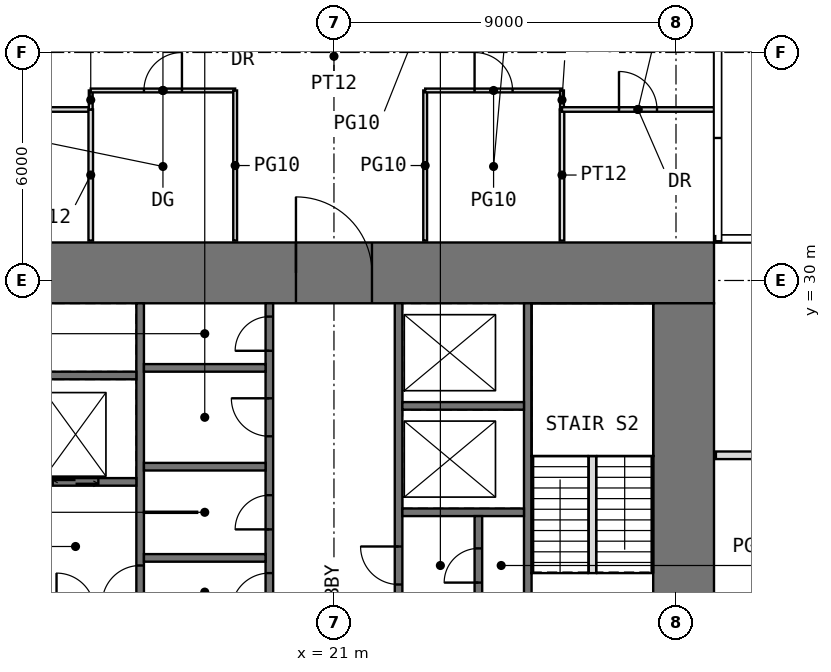
"""IFC4 building model, lengths in metres.
Left out: names, types, materials, properties, quantities, classifications, styles, units other than length and angle.
Written with IfcOpenShell. Run it as: python <this file> out.ifc"""

import sys

from ifc_helpers import new_model, si_unit, direction, frame, frame_2d, origin, place, context, subcontext, project, spatial, rectangle, extrude, element, fill, save


model = new_model("IFC4")
c1 = context("Model", 3, precision=1e-05, world=origin(), true_north=direction((0.0, 1.0)))
c2 = subcontext(c1, "Body", "Model", "MODEL_VIEW")
j1 = project(units=[si_unit("LENGTHUNIT", "METRE"), si_unit("PLANEANGLEUNIT", "RADIAN")], contexts=[c1])
p1 = place(None, origin())
s1 = spatial("IfcSite", under=j1, at=p1, CompositionType="ELEMENT")
p2 = place(p1, origin())
s2 = spatial("IfcBuilding", under=s1, at=p2, CompositionType="ELEMENT")
p3 = place(p2, frame((0.0, 0.0, 104.5)))
s3 = spatial("IfcBuildingStorey", under=s2, at=p3, CompositionType="ELEMENT", Elevation=104.5)
p4 = place(p3, frame((11.0, 30.2, -0.05), z_axis=(0.0, 0.0, 1.0), x_axis=(1.0, 0.0, 0.0)))
e1 = element("IfcWall", 1, at=p4, inside=s3, PredefinedType="SHEAR", context=c2, shape_type="SweptSolid", body=[
    extrude(rectangle(XDim=20.0, YDim=1.6, at=frame_2d((10.0, 0.0))), origin(), (0.0, 0.0, 1.0), 4.0),
])
p5 = place(p4, frame((9.0, 0.0, 0.05)))
e2 = element("IfcOpeningElement", 2, at=p5, cuts=e1, PredefinedType="OPENING", context=c2, shape_type="SweptSolid", body=[
    extrude(rectangle(XDim=2.0, YDim=2.2, at=frame_2d((1.0, 1.1))), frame((0.0, 0.81, 0.0), z_axis=(0.0, -1.0, 0.0), x_axis=(1.0, 0.0, 0.0)), (0.0, 0.0, 1.0), 1.62),
])
p6 = place(p3, frame((30.2, 12.6, -0.05), z_axis=(0.0, 0.0, 1.0), x_axis=(0.0, 1.0, 0.0)))
e3 = element("IfcWall", 3, at=p6, inside=s3, PredefinedType="SHEAR", context=c2, shape_type="SweptSolid", body=[
    extrude(rectangle(XDim=16.8, YDim=1.6, at=frame_2d((8.4, 0.0))), origin(), (0.0, 0.0, 1.0), 4.0),
])
p7 = place(p6, frame((5.9, 0.0, 0.05)))
e4 = element("IfcOpeningElement", 4, at=p7, cuts=e3, PredefinedType="OPENING", context=c2, shape_type="SweptSolid", body=[
    extrude(rectangle(XDim=1.0, YDim=2.2, at=frame_2d((0.5, 1.1))), frame((0.0, 0.81, 0.0), z_axis=(0.0, -1.0, 0.0), x_axis=(1.0, 0.0, 0.0)), (0.0, 0.0, 1.0), 1.62),
])
p8 = place(p3, frame((15.9, 12.6, -0.05), z_axis=(0.0, 0.0, 1.0), x_axis=(0.0, 1.0, 0.0)))
e5 = element("IfcWall", 5, at=p8, inside=s3, PredefinedType="SHEAR", context=c2, shape_type="SweptSolid", body=[
    extrude(rectangle(XDim=16.8, YDim=0.2, at=frame_2d((8.4, 0.0))), origin(), (0.0, 0.0, 1.0), 4.0),
])
p9 = place(p8, frame((8.9, 0.0, 0.05)))
e6 = element("IfcOpeningElement", 6, at=p9, cuts=e5, PredefinedType="OPENING", context=c2, shape_type="SweptSolid", body=[
    extrude(rectangle(XDim=1.0, YDim=2.2, at=frame_2d((0.5, 1.1))), frame((0.0, 0.11, 0.0), z_axis=(0.0, -1.0, 0.0), x_axis=(1.0, 0.0, 0.0)), (0.0, 0.0, 1.0), 0.22),
])
p10 = place(p3, frame((19.3, 12.6, -0.05), z_axis=(0.0, 0.0, 1.0), x_axis=(0.0, 1.0, 0.0)))
e7 = element("IfcWall", 7, at=p10, inside=s3, PredefinedType="SHEAR", context=c2, shape_type="SweptSolid", body=[
    extrude(rectangle(XDim=16.8, YDim=0.2, at=frame_2d((8.4, 0.0))), origin(), (0.0, 0.0, 1.0), 4.0),
])
p11 = place(p10, frame((8.7, 0.0, 0.05)))
e8 = element("IfcOpeningElement", 8, at=p11, cuts=e7, PredefinedType="OPENING", context=c2, shape_type="SweptSolid", body=[
    extrude(rectangle(XDim=1.0, YDim=2.2, at=frame_2d((0.5, 1.1))), frame((0.0, 0.11, 0.0), z_axis=(0.0, -1.0, 0.0), x_axis=(1.0, 0.0, 0.0)), (0.0, 0.0, 1.0), 0.22),
])
p12 = place(p10, frame((10.85, 0.0, 0.05)))
e9 = element("IfcOpeningElement", 9, at=p12, cuts=e7, PredefinedType="OPENING", context=c2, shape_type="SweptSolid", body=[
    extrude(rectangle(XDim=0.9, YDim=2.2, at=frame_2d((0.45, 1.1))), frame((0.0, 0.11, 0.0), z_axis=(0.0, -1.0, 0.0), x_axis=(1.0, 0.0, 0.0)), (0.0, 0.0, 1.0), 0.22),
])
p13 = place(p10, frame((13.3, 0.0, 0.05)))
e10 = element("IfcOpeningElement", 10, at=p13, cuts=e7, PredefinedType="OPENING", context=c2, shape_type="SweptSolid", body=[
    extrude(rectangle(XDim=1.0, YDim=2.2, at=frame_2d((0.5, 1.1))), frame((0.0, 0.11, 0.0), z_axis=(0.0, -1.0, 0.0), x_axis=(1.0, 0.0, 0.0)), (0.0, 0.0, 1.0), 0.22),
])
p14 = place(p10, frame((15.55, 0.0, 0.05)))
e11 = element("IfcOpeningElement", 11, at=p14, cuts=e7, PredefinedType="OPENING", context=c2, shape_type="SweptSolid", body=[
    extrude(rectangle(XDim=0.9, YDim=2.2, at=frame_2d((0.45, 1.1))), frame((0.0, 0.11, 0.0), z_axis=(0.0, -1.0, 0.0), x_axis=(1.0, 0.0, 0.0)), (0.0, 0.0, 1.0), 0.22),
])
p15 = place(p10, frame((0.75, 0.0, 0.05)))
e12 = element("IfcOpeningElement", 12, at=p15, cuts=e7, PredefinedType="OPENING", context=c2, shape_type="SweptSolid", body=[
    extrude(rectangle(XDim=1.1, YDim=2.2, at=frame_2d((0.55, 1.1))), frame((0.0, 0.11, 0.0), z_axis=(0.0, -1.0, 0.0), x_axis=(1.0, 0.0, 0.0)), (0.0, 0.0, 1.0), 0.22),
])
p16 = place(p10, frame((3.55, 0.0, 0.05)))
e13 = element("IfcOpeningElement", 13, at=p16, cuts=e7, PredefinedType="OPENING", context=c2, shape_type="SweptSolid", body=[
    extrude(rectangle(XDim=1.1, YDim=2.2, at=frame_2d((0.55, 1.1))), frame((0.0, 0.11, 0.0), z_axis=(0.0, -1.0, 0.0), x_axis=(1.0, 0.0, 0.0)), (0.0, 0.0, 1.0), 0.22),
])
p17 = place(p10, frame((6.35, 0.0, 0.05)))
e14 = element("IfcOpeningElement", 14, at=p17, cuts=e7, PredefinedType="OPENING", context=c2, shape_type="SweptSolid", body=[
    extrude(rectangle(XDim=1.1, YDim=2.2, at=frame_2d((0.55, 1.1))), frame((0.0, 0.11, 0.0), z_axis=(0.0, -1.0, 0.0), x_axis=(1.0, 0.0, 0.0)), (0.0, 0.0, 1.0), 0.22),
])
p18 = place(p3, frame((22.7, 12.6, -0.05), z_axis=(0.0, 0.0, 1.0), x_axis=(0.0, 1.0, 0.0)))
e15 = element("IfcWall", 15, at=p18, inside=s3, PredefinedType="SHEAR", context=c2, shape_type="SweptSolid", body=[
    extrude(rectangle(XDim=16.8, YDim=0.2, at=frame_2d((8.4, 0.0))), origin(), (0.0, 0.0, 1.0), 4.0),
])
p19 = place(p18, frame((7.1, 0.0, 0.05)))
e16 = element("IfcOpeningElement", 16, at=p19, cuts=e15, PredefinedType="OPENING", context=c2, shape_type="SweptSolid", body=[
    extrude(rectangle(XDim=1.0, YDim=2.2, at=frame_2d((0.5, 1.1))), frame((0.0, 0.11, 0.0), z_axis=(0.0, -1.0, 0.0), x_axis=(1.0, 0.0, 0.0)), (0.0, 0.0, 1.0), 0.22),
])
p20 = place(p18, frame((1.55, 0.0, 0.05)))
e17 = element("IfcOpeningElement", 17, at=p20, cuts=e15, PredefinedType="OPENING", context=c2, shape_type="SweptSolid", body=[
    extrude(rectangle(XDim=0.9, YDim=2.2, at=frame_2d((0.45, 1.1))), frame((0.0, 0.11, 0.0), z_axis=(0.0, -1.0, 0.0), x_axis=(1.0, 0.0, 0.0)), (0.0, 0.0, 1.0), 0.22),
])
p21 = place(p18, frame((4.95, 0.0, 0.05)))
e18 = element("IfcOpeningElement", 18, at=p21, cuts=e15, PredefinedType="OPENING", context=c2, shape_type="SweptSolid", body=[
    extrude(rectangle(XDim=0.9, YDim=2.2, at=frame_2d((0.45, 1.1))), frame((0.0, 0.11, 0.0), z_axis=(0.0, -1.0, 0.0), x_axis=(1.0, 0.0, 0.0)), (0.0, 0.0, 1.0), 0.22),
])
p22 = place(p18, frame((9.4, 0.0, 0.05)))
e19 = element("IfcOpeningElement", 19, at=p22, cuts=e15, PredefinedType="OPENING", context=c2, shape_type="SweptSolid", body=[
    extrude(rectangle(XDim=1.0, YDim=2.2, at=frame_2d((0.5, 1.1))), frame((0.0, 0.11, 0.0), z_axis=(0.0, -1.0, 0.0), x_axis=(1.0, 0.0, 0.0)), (0.0, 0.0, 1.0), 0.22),
])
p23 = place(p3, frame((26.1, 12.6, -0.05), z_axis=(0.0, 0.0, 1.0), x_axis=(0.0, 1.0, 0.0)))
e20 = element("IfcWall", 20, at=p23, inside=s3, PredefinedType="SHEAR", context=c2, shape_type="SweptSolid", body=[
    extrude(rectangle(XDim=16.8, YDim=0.2, at=frame_2d((8.4, 0.0))), origin(), (0.0, 0.0, 1.0), 4.0),
])
p24 = place(p23, frame((6.9, 0.0, 0.05)))
e21 = element("IfcOpeningElement", 21, at=p24, cuts=e20, PredefinedType="OPENING", context=c2, shape_type="SweptSolid", body=[
    extrude(rectangle(XDim=1.0, YDim=2.2, at=frame_2d((0.5, 1.1))), frame((0.0, 0.11, 0.0), z_axis=(0.0, -1.0, 0.0), x_axis=(1.0, 0.0, 0.0)), (0.0, 0.0, 1.0), 0.22),
])
p25 = place(p3, frame((12.6, 24.7, -0.05), z_axis=(0.0, 0.0, 1.0), x_axis=(1.0, 0.0, 0.0)))
e22 = element("IfcWall", 22, at=p25, inside=s3, PredefinedType="SHEAR", context=c2, shape_type="SweptSolid", body=[
    extrude(rectangle(XDim=3.2, YDim=0.2, at=frame_2d((1.6, 0.0))), origin(), (0.0, 0.0, 1.0), 4.0),
])
p26 = place(p25, frame((1.0, 0.0, 0.05)))
e23 = element("IfcOpeningElement", 23, at=p26, cuts=e22, PredefinedType="OPENING", context=c2, shape_type="SweptSolid", body=[
    extrude(rectangle(XDim=1.2, YDim=2.2, at=frame_2d((0.6, 1.1))), frame((0.0, 0.11, 0.0), z_axis=(0.0, -1.0, 0.0), x_axis=(1.0, 0.0, 0.0)), (0.0, 0.0, 1.0), 0.22),
])
for number, where, z_axis, x_axis in (
    (24, (12.6, 27.5, -0.05), (0.0, 0.0, 1.0), (1.0, 0.0, 0.0)),
    (25, (16.0, 22.7, -0.05), (0.0, 0.0, 1.0), (1.0, 0.0, 0.0)),
    (26, (16.0, 25.1, -0.05), (0.0, 0.0, 1.0), (1.0, 0.0, 0.0)),
    (27, (16.0, 27.7, -0.05), (0.0, 0.0, 1.0), (1.0, 0.0, 0.0)),
    (28, (22.8, 23.9, -0.05), (0.0, 0.0, 1.0), (1.0, 0.0, 0.0)),
    (29, (22.8, 26.7, -0.05), (0.0, 0.0, 1.0), (1.0, 0.0, 0.0)),
):
    element("IfcWall", number, at=place(p3, frame(where, z_axis=z_axis, x_axis=x_axis)), inside=s3, PredefinedType="SHEAR", context=c2, shape_type="SweptSolid", body=[
        extrude(rectangle(XDim=3.2, YDim=0.2, at=frame_2d((1.6, 0.0))), origin(), (0.0, 0.0, 1.0), 4.0),
    ])
p27 = place(p3, frame((16.0, 23.9, 0.0), z_axis=(0.0, 0.0, 1.0), x_axis=(1.0, 0.0, 0.0)))
e30 = element("IfcWall", 30, at=p27, inside=s3, PredefinedType="PARTITIONING", context=c2, shape_type="SweptSolid", body=[
    extrude(rectangle(XDim=1.4, YDim=0.03, at=frame_2d((0.7, 0.0))), origin(), (0.0, 0.0, 1.0), 3.75),
])
p28 = place(p3, frame((24.8, 21.2, -0.05), z_axis=(0.0, 0.0, 1.0), x_axis=(0.0, 1.0, 0.0)))
e31 = element("IfcWall", 31, at=p28, inside=s3, PredefinedType="SHEAR", context=c2, shape_type="SweptSolid", body=[
    extrude(rectangle(XDim=2.6, YDim=0.2, at=frame_2d((1.3, 0.0))), origin(), (0.0, 0.0, 1.0), 4.0),
])
p29 = place(p28, frame((0.85, 0.0, 0.05)))
e32 = element("IfcOpeningElement", 32, at=p29, cuts=e31, PredefinedType="OPENING", context=c2, shape_type="SweptSolid", body=[
    extrude(rectangle(XDim=0.9, YDim=2.2, at=frame_2d((0.45, 1.1))), frame((0.0, 0.11, 0.0), z_axis=(0.0, -1.0, 0.0), x_axis=(1.0, 0.0, 0.0)), (0.0, 0.0, 1.0), 0.22),
])
p30 = place(p3, frame((11.0, 34.5, 0.0), z_axis=(0.0, 0.0, 1.0), x_axis=(1.0, 0.0, 0.0)))
e33 = element("IfcWall", 33, at=p30, inside=s3, PredefinedType="PARTITIONING", context=c2, shape_type="SweptSolid", body=[
    extrude(rectangle(XDim=3.6, YDim=0.12, at=frame_2d((1.8, 0.0))), origin(), (0.0, 0.0, 1.0), 3.75),
])
p31 = place(p30, frame((1.3, 0.0, 0.0)))
e34 = element("IfcOpeningElement", 34, at=p31, cuts=e33, PredefinedType="OPENING", context=c2, shape_type="SweptSolid", body=[
    extrude(rectangle(XDim=1.0, YDim=2.2, at=frame_2d((0.5, 1.1))), frame((0.0, 0.07, 0.0), z_axis=(0.0, -1.0, 0.0), x_axis=(1.0, 0.0, 0.0)), (0.0, 0.0, 1.0), 0.14),
])
p32 = place(p3, frame((14.6, 31.05, 0.0), z_axis=(0.0, 0.0, 1.0), x_axis=(0.0, 1.0, 0.0)))
e35 = element("IfcWall", 35, at=p32, inside=s3, PredefinedType="PARTITIONING", context=c2, shape_type="SweptSolid", body=[
    extrude(rectangle(XDim=3.45, YDim=0.12, at=frame_2d((1.725, 0.0))), origin(), (0.0, 0.0, 1.0), 3.75),
])
p33 = place(p3, frame((14.6, 34.5, 0.0), z_axis=(0.0, 0.0, 1.0), x_axis=(0.0, 1.0, 0.0)))
e36 = element("IfcWall", 36, at=p33, inside=s3, PredefinedType="PARTITIONING", context=c2, shape_type="SweptSolid", body=[
    extrude(rectangle(XDim=0.5, YDim=0.1, at=frame_2d((0.25, 0.0))), origin(), (0.0, 0.0, 1.0), 3.75),
])
p34 = place(p3, frame((14.6, 35.0, 0.0), z_axis=(0.0, 0.0, 1.0), x_axis=(1.0, 0.0, 0.0)))
e37 = element("IfcWall", 37, at=p34, inside=s3, PredefinedType="PARTITIONING", context=c2, shape_type="SweptSolid", body=[
    extrude(rectangle(XDim=3.8, YDim=0.1, at=frame_2d((1.9, 0.0))), origin(), (0.0, 0.0, 1.0), 3.75),
])
p35 = place(p34, frame((1.4, 0.0, 0.0)))
e38 = element("IfcOpeningElement", 38, at=p35, cuts=e37, PredefinedType="OPENING", context=c2, shape_type="SweptSolid", body=[
    extrude(rectangle(XDim=1.0, YDim=2.4, at=frame_2d((0.5, 1.2))), frame((0.0, 0.06, 0.0), z_axis=(0.0, -1.0, 0.0), x_axis=(1.0, 0.0, 0.0)), (0.0, 0.0, 1.0), 0.12),
])
for number, where, z_axis, x_axis in (
    (39, (18.4, 31.05, 0.0), (0.0, 0.0, 1.0), (0.0, 1.0, 0.0)),
    (40, (23.4, 31.05, 0.0), (0.0, 0.0, 1.0), (0.0, 1.0, 0.0)),
):
    element("IfcWall", number, at=place(p3, frame(where, z_axis=z_axis, x_axis=x_axis)), inside=s3, PredefinedType="PARTITIONING", context=c2, shape_type="SweptSolid", body=[
        extrude(rectangle(XDim=3.95, YDim=0.1, at=frame_2d((1.975, 0.0))), origin(), (0.0, 0.0, 1.0), 3.75),
    ])
p36 = place(p3, frame((23.4, 35.0, 0.0), z_axis=(0.0, 0.0, 1.0), x_axis=(1.0, 0.0, 0.0)))
e41 = element("IfcWall", 41, at=p36, inside=s3, PredefinedType="PARTITIONING", context=c2, shape_type="SweptSolid", body=[
    extrude(rectangle(XDim=3.6, YDim=0.1, at=frame_2d((1.8, 0.0))), origin(), (0.0, 0.0, 1.0), 3.75),
])
p37 = place(p36, frame((1.3, 0.0, 0.0)))
e42 = element("IfcOpeningElement", 42, at=p37, cuts=e41, PredefinedType="OPENING", context=c2, shape_type="SweptSolid", body=[
    extrude(rectangle(XDim=1.0, YDim=2.4, at=frame_2d((0.5, 1.2))), frame((0.0, 0.06, 0.0), z_axis=(0.0, -1.0, 0.0), x_axis=(1.0, 0.0, 0.0)), (0.0, 0.0, 1.0), 0.12),
])
p38 = place(p3, frame((27.0, 31.05, 0.0), z_axis=(0.0, 0.0, 1.0), x_axis=(0.0, 1.0, 0.0)))
e43 = element("IfcWall", 43, at=p38, inside=s3, PredefinedType="PARTITIONING", context=c2, shape_type="SweptSolid", body=[
    extrude(rectangle(XDim=3.45, YDim=0.12, at=frame_2d((1.725, 0.0))), origin(), (0.0, 0.0, 1.0), 3.75),
])
p39 = place(p3, frame((27.0, 34.5, 0.0), z_axis=(0.0, 0.0, 1.0), x_axis=(0.0, 1.0, 0.0)))
e44 = element("IfcWall", 44, at=p39, inside=s3, PredefinedType="PARTITIONING", context=c2, shape_type="SweptSolid", body=[
    extrude(rectangle(XDim=0.5, YDim=0.1, at=frame_2d((0.25, 0.0))), origin(), (0.0, 0.0, 1.0), 3.75),
])
p40 = place(p3, frame((27.0, 34.5, 0.0), z_axis=(0.0, 0.0, 1.0), x_axis=(1.0, 0.0, 0.0)))
e45 = element("IfcWall", 45, at=p40, inside=s3, PredefinedType="PARTITIONING", context=c2, shape_type="SweptSolid", body=[
    extrude(rectangle(XDim=4.0, YDim=0.12, at=frame_2d((2.0, 0.0))), origin(), (0.0, 0.0, 1.0), 3.75),
])
p41 = place(p40, frame((1.5, 0.0, 0.0)))
e46 = element("IfcOpeningElement", 46, at=p41, cuts=e45, PredefinedType="OPENING", context=c2, shape_type="SweptSolid", body=[
    extrude(rectangle(XDim=1.0, YDim=2.2, at=frame_2d((0.5, 1.1))), frame((0.0, 0.07, 0.0), z_axis=(0.0, -1.0, 0.0), x_axis=(1.0, 0.0, 0.0)), (0.0, 0.0, 1.0), 0.14),
])
p42 = place(p3, frame((31.05, 25.4, 0.0), z_axis=(0.0, 0.0, 1.0), x_axis=(1.0, 0.0, 0.0)))
e47 = element("IfcWall", 47, at=p42, inside=s3, PredefinedType="PARTITIONING", context=c2, shape_type="SweptSolid", body=[
    extrude(rectangle(XDim=3.95, YDim=0.2, at=frame_2d((1.975, 0.0))), origin(), (0.0, 0.0, 1.0), 3.75),
])
p43 = place(p3, frame((27.8, 22.3, 0.0), z_axis=(0.0, 0.0, 1.0), x_axis=(0.0, 1.0, 0.0)))
e48 = element("IfcWall", 48, at=p43, inside=s3, PredefinedType="PARTITIONING", context=c2, shape_type="SweptSolid", body=[
    extrude(rectangle(XDim=3.08, YDim=0.2, at=frame_2d((1.54, 0.0))), origin(), (0.0, 0.0, 1.0), 4.0),
])
p44 = place(p5, origin())
e49 = element("IfcDoor", 49, at=p44, inside=s3, OperationType="DOUBLE_DOOR_SINGLE_SWING", PredefinedType="DOOR", context=c2, shape_type="SweptSolid", body=[
    extrude(rectangle(XDim=2.0, YDim=2.2, at=frame_2d((1.0, 1.1))), frame((0.0, 0.025, 0.0), z_axis=(0.0, -1.0, 0.0), x_axis=(1.0, 0.0, 0.0)), (0.0, 0.0, 1.0), 0.05),
])
fill(e2, e49)
p45 = place(p9, origin())
e50 = element("IfcDoor", 50, at=p45, inside=s3, OperationType="SINGLE_SWING_LEFT", PredefinedType="DOOR", context=c2, shape_type="SweptSolid", body=[
    extrude(rectangle(XDim=1.0, YDim=2.2, at=frame_2d((0.5, 1.1))), frame((0.0, 0.025, 0.0), z_axis=(0.0, -1.0, 0.0), x_axis=(1.0, 0.0, 0.0)), (0.0, 0.0, 1.0), 0.05),
])
fill(e6, e50)
p46 = place(p11, origin())
e51 = element("IfcDoor", 51, at=p46, inside=s3, OperationType="SINGLE_SWING_LEFT", PredefinedType="DOOR", context=c2, shape_type="SweptSolid", body=[
    extrude(rectangle(XDim=1.0, YDim=2.2, at=frame_2d((0.5, 1.1))), frame((0.0, 0.025, 0.0), z_axis=(0.0, -1.0, 0.0), x_axis=(1.0, 0.0, 0.0)), (0.0, 0.0, 1.0), 0.05),
])
fill(e8, e51)
p47 = place(p12, origin())
e52 = element("IfcDoor", 52, at=p47, inside=s3, OperationType="SINGLE_SWING_LEFT", PredefinedType="DOOR", context=c2, shape_type="SweptSolid", body=[
    extrude(rectangle(XDim=0.9, YDim=2.2, at=frame_2d((0.45, 1.1))), frame((0.0, 0.025, 0.0), z_axis=(0.0, -1.0, 0.0), x_axis=(1.0, 0.0, 0.0)), (0.0, 0.0, 1.0), 0.05),
])
fill(e9, e52)
p48 = place(p13, origin())
e53 = element("IfcDoor", 53, at=p48, inside=s3, OperationType="SINGLE_SWING_RIGHT", PredefinedType="DOOR", context=c2, shape_type="SweptSolid", body=[
    extrude(rectangle(XDim=1.0, YDim=2.2, at=frame_2d((0.5, 1.1))), frame((0.0, 0.025, 0.0), z_axis=(0.0, -1.0, 0.0), x_axis=(1.0, 0.0, 0.0)), (0.0, 0.0, 1.0), 0.05),
])
fill(e10, e53)
p49 = place(p14, origin())
e54 = element("IfcDoor", 54, at=p49, inside=s3, OperationType="SINGLE_SWING_LEFT", PredefinedType="DOOR", context=c2, shape_type="SweptSolid", body=[
    extrude(rectangle(XDim=0.9, YDim=2.2, at=frame_2d((0.45, 1.1))), frame((0.0, 0.025, 0.0), z_axis=(0.0, -1.0, 0.0), x_axis=(1.0, 0.0, 0.0)), (0.0, 0.0, 1.0), 0.05),
])
fill(e11, e54)
p50 = place(p22, origin())
e55 = element("IfcDoor", 55, at=p50, inside=s3, OperationType="SINGLE_SWING_RIGHT", PredefinedType="DOOR", context=c2, shape_type="SweptSolid", body=[
    extrude(rectangle(XDim=1.0, YDim=2.2, at=frame_2d((0.5, 1.1))), frame((0.0, 0.025, 0.0), z_axis=(0.0, -1.0, 0.0), x_axis=(1.0, 0.0, 0.0)), (0.0, 0.0, 1.0), 0.05),
])
fill(e19, e55)
p51 = place(p29, origin())
e56 = element("IfcDoor", 56, at=p51, inside=s3, OperationType="SINGLE_SWING_LEFT", PredefinedType="DOOR", context=c2, shape_type="SweptSolid", body=[
    extrude(rectangle(XDim=0.9, YDim=2.2, at=frame_2d((0.45, 1.1))), frame((0.0, 0.025, 0.0), z_axis=(0.0, -1.0, 0.0), x_axis=(1.0, 0.0, 0.0)), (0.0, 0.0, 1.0), 0.05),
])
fill(e32, e56)
p52 = place(p35, origin())
e57 = element("IfcDoor", 57, at=p52, inside=s3, OperationType="SINGLE_SWING_RIGHT", PredefinedType="DOOR", context=c2, shape_type="SweptSolid", body=[
    extrude(rectangle(XDim=1.0, YDim=2.4, at=frame_2d((0.5, 1.2))), frame((0.0, 0.025, 0.0), z_axis=(0.0, -1.0, 0.0), x_axis=(1.0, 0.0, 0.0)), (0.0, 0.0, 1.0), 0.05),
])
fill(e38, e57)
p53 = place(p37, origin())
e58 = element("IfcDoor", 58, at=p53, inside=s3, OperationType="SINGLE_SWING_LEFT", PredefinedType="DOOR", context=c2, shape_type="SweptSolid", body=[
    extrude(rectangle(XDim=1.0, YDim=2.4, at=frame_2d((0.5, 1.2))), frame((0.0, 0.025, 0.0), z_axis=(0.0, -1.0, 0.0), x_axis=(1.0, 0.0, 0.0)), (0.0, 0.0, 1.0), 0.05),
])
fill(e42, e58)
p54 = place(p41, origin())
e59 = element("IfcDoor", 59, at=p54, inside=s3, OperationType="SINGLE_SWING_LEFT", PredefinedType="DOOR", context=c2, shape_type="SweptSolid", body=[
    extrude(rectangle(XDim=1.0, YDim=2.2, at=frame_2d((0.5, 1.1))), frame((0.0, 0.025, 0.0), z_axis=(0.0, -1.0, 0.0), x_axis=(1.0, 0.0, 0.0)), (0.0, 0.0, 1.0), 0.05),
])
fill(e46, e59)
p55 = place(p26, origin())
e60 = element("IfcDoor", 60, at=p55, inside=s3, OperationType="DOUBLE_DOOR_SLIDING", PredefinedType="DOOR", context=c2, shape_type="SweptSolid", body=[
    extrude(rectangle(XDim=1.2, YDim=2.2, at=frame_2d((0.6, 1.1))), frame((0.0, 0.025, 0.0), z_axis=(0.0, -1.0, 0.0), x_axis=(1.0, 0.0, 0.0)), (0.0, 0.0, 1.0), 0.05),
])
fill(e23, e60)
save(model, sys.argv[1])
